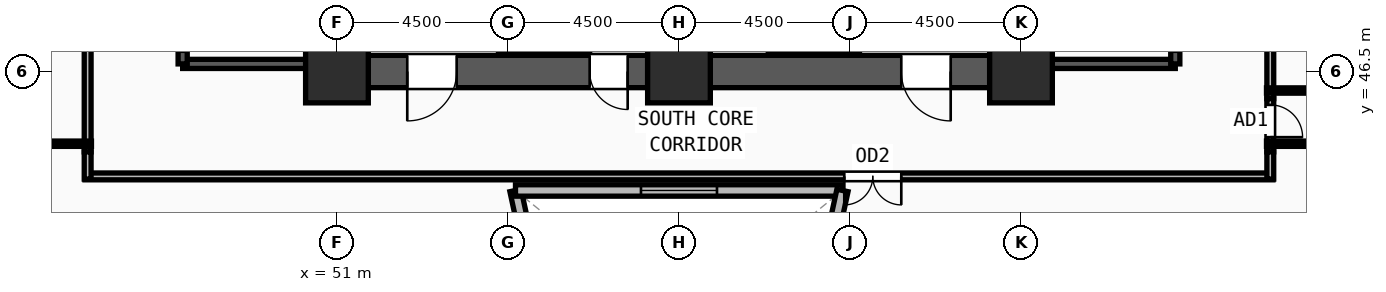
"""IFC4 building model, lengths in metres.
Left out: names, types, materials, properties, quantities, classifications, styles, units other than length and angle.
Written with IfcOpenShell. Run it as: python <this file> out.ifc"""

import sys

from ifc_helpers import new_model, si_unit, direction, frame, frame_2d, origin, origin_2d, place, context, subcontext, project, spatial, rectangle, extrude, source, transform, mapped, element, fill, save


model = new_model("IFC4")
c1 = context("Model", 3, precision=1e-05, world=origin(), true_north=direction((0.0, 1.0)))
c2 = subcontext(c1, "Body", "Model", "MODEL_VIEW")
j1 = project(units=[si_unit("LENGTHUNIT", "METRE"), si_unit("PLANEANGLEUNIT", "RADIAN")], contexts=[c1])
p1 = place(None, origin())
s1 = spatial("IfcSite", under=j1, at=p1, CompositionType="ELEMENT")
p2 = place(p1, origin())
s2 = spatial("IfcBuilding", under=s1, at=p2, CompositionType="ELEMENT")
p3 = place(p2, frame((0.0, 0.0, 63.0)))
s3 = spatial("IfcBuildingStorey", under=s2, at=p3, CompositionType="ELEMENT", Elevation=63.0)
m1 = source(origin(), c2, "Body", "SweptSolid", [
    extrude(rectangle(XDim=1.65, YDim=1.65, at=origin_2d()), origin(), (0.0, 0.0, 1.0), 3.75),
])
for number, where, z_axis, x_axis in (
    (1, (51.0, 46.5, 0.0), (0.0, 0.0, 1.0), (1.0, 0.0, 0.0)),
    (2, (60.0, 46.5, 0.0), (0.0, 0.0, 1.0), (1.0, 0.0, 0.0)),
    (3, (69.0, 46.5, 0.0), (0.0, 0.0, 1.0), (1.0, 0.0, 0.0)),
):
    element("IfcColumn", number, at=place(p3, frame(where, z_axis=z_axis, x_axis=x_axis)), inside=s3, PredefinedType="COLUMN", context=c2, shape_type="MappedRepresentation", body=[
        mapped(m1, transform((0.0, 0.0, 0.0), x_axis=(1.0, 0.0, 0.0), y_axis=(0.0, 1.0, 0.0), z_axis=(0.0, 0.0, 1.0), scale=1.0)),
    ])
p4 = place(p3, frame((68.175, 46.5, 0.0), z_axis=(0.0, 0.0, 1.0), x_axis=(-1.0, 0.0, 0.0)))
e4 = element("IfcWall", 4, at=p4, inside=s3, PredefinedType="SHEAR", context=c2, shape_type="SweptSolid", body=[
    extrude(rectangle(XDim=7.35, YDim=0.85, at=frame_2d((3.675, 0.0))), origin(), (0.0, 0.0, 1.0), 3.57),
])
m2 = source(origin(), c2, "Body", "SweptSolid", [
    extrude(rectangle(XDim=1.3, YDim=2.2, at=frame_2d((0.65, 1.1))), frame((0.0, 0.435, 0.0), z_axis=(0.0, -1.0, 0.0), x_axis=(1.0, 0.0, 0.0)), (0.0, 0.0, 1.0), 0.87),
])
p5 = place(p4, frame((1.025, 0.0, 0.0)))
e5 = element("IfcOpeningElement", 5, at=p5, cuts=e4, PredefinedType="OPENING", context=c2, shape_type="MappedRepresentation", body=[
    mapped(m2, transform((0.0, 0.0, 0.0), x_axis=(1.0, 0.0, 0.0), y_axis=(0.0, 1.0, 0.0), z_axis=(0.0, 0.0, 1.0), scale=1.0)),
])
p6 = place(p3, frame((59.175, 46.5, 0.0), z_axis=(0.0, 0.0, 1.0), x_axis=(-1.0, 0.0, 0.0)))
e6 = element("IfcWall", 6, at=p6, inside=s3, PredefinedType="SHEAR", context=c2, shape_type="SweptSolid", body=[
    extrude(rectangle(XDim=7.35, YDim=0.85, at=frame_2d((3.675, 0.0))), origin(), (0.0, 0.0, 1.0), 3.57),
])
p7 = place(p6, frame((5.025, 0.0, 0.0)))
e7 = element("IfcOpeningElement", 7, at=p7, cuts=e6, PredefinedType="OPENING", context=c2, shape_type="MappedRepresentation", body=[
    mapped(m2, transform((0.0, 0.0, 0.0), x_axis=(1.0, 0.0, 0.0), y_axis=(0.0, 1.0, 0.0), z_axis=(0.0, 0.0, 1.0), scale=1.0)),
])
m3 = source(origin(), c2, "Body", "SweptSolid", [
    extrude(rectangle(XDim=1.0, YDim=2.2, at=frame_2d((0.5, 1.1))), frame((0.0, 0.435, 0.0), z_axis=(0.0, -1.0, 0.0), x_axis=(1.0, 0.0, 0.0)), (0.0, 0.0, 1.0), 0.87),
])
p8 = place(p6, frame((0.525, 0.0, 0.0)))
e8 = element("IfcOpeningElement", 8, at=p8, cuts=e6, PredefinedType="OPENING", context=c2, shape_type="MappedRepresentation", body=[
    mapped(m3, transform((0.0, 0.0, 0.0), x_axis=(1.0, 0.0, 0.0), y_axis=(0.0, 1.0, 0.0), z_axis=(0.0, 0.0, 1.0), scale=1.0)),
])
p9 = place(p3, frame((46.94, 46.7, 0.0), z_axis=(0.0, 0.0, 1.0), x_axis=(1.0, 0.0, 0.0)))
e9 = element("IfcWall", 9, at=p9, inside=s3, PredefinedType="SOLIDWALL", context=c2, shape_type="SweptSolid", body=[
    extrude(rectangle(XDim=3.44, YDim=0.24, at=frame_2d((1.72, 0.0))), origin(), (0.0, 0.0, 1.0), 3.57),
])
p10 = place(p3, frame((50.38, 46.7, 0.0), z_axis=(0.0, 0.0, 1.0), x_axis=(0.0, 1.0, 0.0)))
e10 = element("IfcWall", 10, at=p10, inside=s3, PredefinedType="SOLIDWALL", context=c2, shape_type="SweptSolid", body=[
    extrude(rectangle(XDim=7.82, YDim=0.24, at=frame_2d((3.91, 0.0))), origin(), (0.0, 0.0, 1.0), 3.57),
])
p11 = place(p3, frame((46.94, 54.52, 0.0), z_axis=(0.0, 0.0, 1.0), x_axis=(0.0, -1.0, 0.0)))
e11 = element("IfcWall", 11, at=p11, inside=s3, PredefinedType="SOLIDWALL", context=c2, shape_type="SweptSolid", body=[
    extrude(rectangle(XDim=7.82, YDim=0.24, at=frame_2d((3.91, 0.0))), origin(), (0.0, 0.0, 1.0), 3.57),
])
m4 = source(origin(), c2, "Body", "SweptSolid", [
    extrude(rectangle(XDim=1.2, YDim=2.2, at=frame_2d((0.6, 1.1))), frame((0.0, 0.13, 0.0), z_axis=(0.0, -1.0, 0.0), x_axis=(1.0, 0.0, 0.0)), (0.0, 0.0, 1.0), 0.26),
])
p12 = place(p11, frame((6.3, 0.0, 0.0)))
e12 = element("IfcOpeningElement", 12, at=p12, cuts=e11, PredefinedType="OPENING", context=c2, shape_type="MappedRepresentation", body=[
    mapped(m4, transform((0.0, 0.0, 0.0), x_axis=(1.0, 0.0, 0.0), y_axis=(0.0, 1.0, 0.0), z_axis=(0.0, 0.0, 1.0), scale=1.0)),
])
p13 = place(p3, frame((69.62, 46.7, 0.0), z_axis=(0.0, 0.0, 1.0), x_axis=(1.0, 0.0, 0.0)))
e13 = element("IfcWall", 13, at=p13, inside=s3, PredefinedType="SOLIDWALL", context=c2, shape_type="SweptSolid", body=[
    extrude(rectangle(XDim=3.44, YDim=0.24, at=frame_2d((1.72, 0.0))), origin(), (0.0, 0.0, 1.0), 3.57),
])
p14 = place(p3, frame((73.06, 46.7, 0.0), z_axis=(0.0, 0.0, 1.0), x_axis=(0.0, 1.0, 0.0)))
e14 = element("IfcWall", 14, at=p14, inside=s3, PredefinedType="SOLIDWALL", context=c2, shape_type="SweptSolid", body=[
    extrude(rectangle(XDim=7.82, YDim=0.24, at=frame_2d((3.91, 0.0))), origin(), (0.0, 0.0, 1.0), 3.57),
])
p15 = place(p14, frame((0.32, 0.0, 0.0)))
e15 = element("IfcOpeningElement", 15, at=p15, cuts=e14, PredefinedType="OPENING", context=c2, shape_type="MappedRepresentation", body=[
    mapped(m4, transform((0.0, 0.0, 0.0), x_axis=(1.0, 0.0, 0.0), y_axis=(0.0, 1.0, 0.0), z_axis=(0.0, 0.0, 1.0), scale=1.0)),
])
p16 = place(p3, frame((69.62, 54.52, 0.0), z_axis=(0.0, 0.0, 1.0), x_axis=(0.0, -1.0, 0.0)))
e16 = element("IfcWall", 16, at=p16, inside=s3, PredefinedType="SOLIDWALL", context=c2, shape_type="SweptSolid", body=[
    extrude(rectangle(XDim=7.82, YDim=0.24, at=frame_2d((3.91, 0.0))), origin(), (0.0, 0.0, 1.0), 3.57),
])
p17 = place(p3, frame((57.204, 36.407, 0.0), z_axis=(0.0, 0.0, 1.0), x_axis=(-0.211408002859, 0.977397900718, 0.0)))
e17 = element("IfcWall", 17, at=p17, inside=s3, PredefinedType="SOLIDWALL", context=c2, shape_type="SweptSolid", body=[
    extrude(rectangle(XDim=7.124, YDim=0.3, at=frame_2d((3.562, 0.0))), origin(), (0.0, 0.0, 1.0), 3.57),
])
m5 = source(origin(), c2, "Body", "SweptSolid", [
    extrude(rectangle(XDim=2.0, YDim=1.9, at=frame_2d((1.0, 0.95))), frame((0.0, 0.16, 0.0), z_axis=(0.0, -1.0, 0.0), x_axis=(1.0, 0.0, 0.0)), (0.0, 0.0, 1.0), 0.32),
])
p18 = place(p17, frame((2.562, 0.0, 0.55)))
e18 = element("IfcOpeningElement", 18, at=p18, cuts=e17, PredefinedType="OPENING", context=c2, shape_type="MappedRepresentation", body=[
    mapped(m5, transform((0.0, 0.0, 0.0), x_axis=(1.0, 0.0, 0.0), y_axis=(0.0, 1.0, 0.0), z_axis=(0.0, 0.0, 1.0), scale=1.0)),
])
p19 = place(p3, frame((55.698, 43.37, 0.0), z_axis=(0.0, 0.0, 1.0), x_axis=(1.0, 0.0, 0.0)))
e19 = element("IfcWall", 19, at=p19, inside=s3, PredefinedType="SOLIDWALL", context=c2, shape_type="SweptSolid", body=[
    extrude(rectangle(XDim=8.604, YDim=0.3, at=frame_2d((4.302, 0.0))), origin(), (0.0, 0.0, 1.0), 3.57),
])
p20 = place(p19, frame((3.302, 0.0, 0.55)))
e20 = element("IfcOpeningElement", 20, at=p20, cuts=e19, PredefinedType="OPENING", context=c2, shape_type="MappedRepresentation", body=[
    mapped(m5, transform((0.0, 0.0, 0.0), x_axis=(1.0, 0.0, 0.0), y_axis=(0.0, 1.0, 0.0), z_axis=(0.0, 0.0, 1.0), scale=1.0)),
])
p21 = place(p3, frame((64.302, 43.37, 0.0), z_axis=(0.0, 0.0, 1.0), x_axis=(-0.211408002859, -0.977397900718, 0.0)))
e21 = element("IfcWall", 21, at=p21, inside=s3, PredefinedType="SOLIDWALL", context=c2, shape_type="SweptSolid", body=[
    extrude(rectangle(XDim=7.124, YDim=0.3, at=frame_2d((3.562, 0.0))), origin(), (0.0, 0.0, 1.0), 3.57),
])
p22 = place(p21, frame((2.562, 0.0, 0.55)))
e22 = element("IfcOpeningElement", 22, at=p22, cuts=e21, PredefinedType="OPENING", context=c2, shape_type="MappedRepresentation", body=[
    mapped(m5, transform((0.0, 0.0, 0.0), x_axis=(1.0, 0.0, 0.0), y_axis=(0.0, 1.0, 0.0), z_axis=(0.0, 0.0, 1.0), scale=1.0)),
])
p23 = place(p3, frame((75.56, 56.34, 0.0), z_axis=(0.0, 0.0, 1.0), x_axis=(0.0, -1.0, 0.0)))
e23 = element("IfcWall", 23, at=p23, inside=s3, PredefinedType="PARTITIONING", context=c2, shape_type="SweptSolid", body=[
    extrude(rectangle(XDim=10.555, YDim=0.18, at=frame_2d((5.278, 0.0))), origin(), (0.0, 0.0, 1.0), 3.57),
])
m6 = source(origin(), c2, "Body", "SweptSolid", [
    extrude(rectangle(XDim=1.5, YDim=2.2, at=frame_2d((0.75, 1.1))), frame((0.0, 0.1, 0.0), z_axis=(0.0, -1.0, 0.0), x_axis=(1.0, 0.0, 0.0)), (0.0, 0.0, 1.0), 0.2),
])
p24 = place(p23, frame((4.528, 0.0, 0.0)))
e24 = element("IfcOpeningElement", 24, at=p24, cuts=e23, PredefinedType="OPENING", context=c2, shape_type="MappedRepresentation", body=[
    mapped(m6, transform((0.0, 0.0, 0.0), x_axis=(1.0, 0.0, 0.0), y_axis=(0.0, 1.0, 0.0), z_axis=(0.0, 0.0, 1.0), scale=1.0)),
])
p25 = place(p3, frame((44.44, 44.385, 0.0), z_axis=(0.0, 0.0, 1.0), x_axis=(0.0, 1.0, 0.0)))
e25 = element("IfcWall", 25, at=p25, inside=s3, PredefinedType="PARTITIONING", context=c2, shape_type="SweptSolid", body=[
    extrude(rectangle(XDim=9.9, YDim=0.18, at=frame_2d((4.95, 0.0))), origin(), (0.0, 0.0, 1.0), 3.57),
])
p26 = place(p25, frame((4.2, 0.0, 0.0)))
e26 = element("IfcOpeningElement", 26, at=p26, cuts=e25, PredefinedType="OPENING", context=c2, shape_type="MappedRepresentation", body=[
    mapped(m6, transform((0.0, 0.0, 0.0), x_axis=(1.0, 0.0, 0.0), y_axis=(0.0, 1.0, 0.0), z_axis=(0.0, 0.0, 1.0), scale=1.0)),
])
p27 = place(p3, frame((75.63, 43.74, 0.0), z_axis=(0.0, 0.0, 1.0), x_axis=(-1.0, 0.0, 0.0)))
e27 = element("IfcWall", 27, at=p27, inside=s3, PredefinedType="PARTITIONING", context=c2, shape_type="SweptSolid", body=[
    extrude(rectangle(XDim=31.26, YDim=0.18, at=frame_2d((15.63, 0.0))), origin(), (0.0, 0.0, 1.0), 3.57),
])
p28 = place(p27, frame((9.78, 0.0, 0.0)))
e28 = element("IfcOpeningElement", 28, at=p28, cuts=e27, PredefinedType="OPENING", context=c2, shape_type="MappedRepresentation", body=[
    mapped(m6, transform((0.0, 0.0, 0.0), x_axis=(1.0, 0.0, 0.0), y_axis=(0.0, 1.0, 0.0), z_axis=(0.0, 0.0, 1.0), scale=1.0)),
])
p29 = place(p3, frame((75.56, 45.785, 0.0), z_axis=(0.0, 0.0, 1.0), x_axis=(0.0, -1.0, 0.0)))
e29 = element("IfcWall", 29, at=p29, inside=s3, PredefinedType="PARTITIONING", context=c2, shape_type="SweptSolid", body=[
    extrude(rectangle(XDim=1.4, YDim=0.18, at=frame_2d((0.7, 0.0))), origin(), (0.0, 0.0, 1.0), 3.57),
])
m7 = source(origin(), c2, "Body", "SweptSolid", [
    extrude(rectangle(XDim=0.85, YDim=2.1, at=frame_2d((0.425, 1.05))), frame((0.0, 0.1, 0.0), z_axis=(0.0, -1.0, 0.0), x_axis=(1.0, 0.0, 0.0)), (0.0, 0.0, 1.0), 0.2),
])
p30 = place(p29, frame((0.163, 0.0, 0.0)))
e30 = element("IfcOpeningElement", 30, at=p30, cuts=e29, PredefinedType="OPENING", context=c2, shape_type="MappedRepresentation", body=[
    mapped(m7, transform((0.0, 0.0, 0.0), x_axis=(1.0, 0.0, 0.0), y_axis=(0.0, 1.0, 0.0), z_axis=(0.0, 0.0, 1.0), scale=1.0)),
])
for number, where, z_axis, x_axis in (
    (31, (44.44, 43.67, 0.0), (0.0, 0.0, 1.0), (0.0, 1.0, 0.0)),
    (32, (75.56, 44.385, 0.0), (0.0, 0.0, 1.0), (0.0, -1.0, 0.0)),
):
    element("IfcWall", number, at=place(p3, frame(where, z_axis=z_axis, x_axis=x_axis)), inside=s3, PredefinedType="PARTITIONING", context=c2, shape_type="SweptSolid", body=[
        extrude(rectangle(XDim=0.715, YDim=0.18, at=frame_2d((0.357, 0.0))), origin(), (0.0, 0.0, 1.0), 3.57),
    ])
p31 = place(p3, frame((44.54, 44.6, 0.0), z_axis=(0.0, 0.0, 1.0), x_axis=(-1.0, 0.0, 0.0)))
e33 = element("IfcWall", 33, at=p31, inside=s3, PredefinedType="PARTITIONING", context=c2, shape_type="SweptSolid", body=[
    extrude(rectangle(XDim=11.229, YDim=0.14, at=frame_2d((5.615, 0.0))), origin(), (0.0, 0.0, 1.0), 3.57),
])
p32 = place(p3, frame((75.46, 44.6, 0.0), z_axis=(0.0, 0.0, 1.0), x_axis=(1.0, 0.0, 0.0)))
e34 = element("IfcWall", 34, at=p32, inside=s3, PredefinedType="PARTITIONING", context=c2, shape_type="SweptSolid", body=[
    extrude(rectangle(XDim=11.568, YDim=0.14, at=frame_2d((5.784, 0.0))), origin(), (0.0, 0.0, 1.0), 2.705),
])
p33 = place(p3, frame((75.46, 46.0, 0.0), z_axis=(0.0, 0.0, 1.0), x_axis=(1.0, 0.0, 0.0)))
e35 = element("IfcWall", 35, at=p33, inside=s3, PredefinedType="PARTITIONING", context=c2, shape_type="SweptSolid", body=[
    extrude(rectangle(XDim=12.255, YDim=0.14, at=frame_2d((6.127, 0.0))), origin(), (0.0, 0.0, 1.0), 3.57),
])
m8 = source(origin(), c2, "Body", "SweptSolid", [
    extrude(rectangle(XDim=1.3, YDim=2.2, at=frame_2d((0.65, 1.1))), frame((0.0, 0.025, 0.0), z_axis=(0.0, -1.0, 0.0), x_axis=(1.0, 0.0, 0.0)), (0.0, 0.0, 1.0), 0.05),
])
p34 = place(p7, origin())
e36 = element("IfcDoor", 36, at=p34, inside=s3, OperationType="SINGLE_SWING_RIGHT", PredefinedType="DOOR", context=c2, shape_type="MappedRepresentation", body=[
    mapped(m8, transform((0.0, 0.0, 0.0), x_axis=(1.0, 0.0, 0.0), y_axis=(0.0, 1.0, 0.0), z_axis=(0.0, 0.0, 1.0), scale=1.0)),
])
fill(e7, e36)
m9 = source(origin(), c2, "Body", "SweptSolid", [
    extrude(rectangle(XDim=1.0, YDim=2.2, at=frame_2d((0.5, 1.1))), frame((0.0, 0.025, 0.0), z_axis=(0.0, -1.0, 0.0), x_axis=(1.0, 0.0, 0.0)), (0.0, 0.0, 1.0), 0.05),
])
p35 = place(p8, origin())
e37 = element("IfcDoor", 37, at=p35, inside=s3, OperationType="SINGLE_SWING_LEFT", PredefinedType="DOOR", context=c2, shape_type="MappedRepresentation", body=[
    mapped(m9, transform((0.0, 0.0, 0.0), x_axis=(1.0, 0.0, 0.0), y_axis=(0.0, 1.0, 0.0), z_axis=(0.0, 0.0, 1.0), scale=1.0)),
])
fill(e8, e37)
p36 = place(p5, origin())
e38 = element("IfcDoor", 38, at=p36, inside=s3, OperationType="SINGLE_SWING_LEFT", PredefinedType="DOOR", context=c2, shape_type="MappedRepresentation", body=[
    mapped(m8, transform((0.0, 0.0, 0.0), x_axis=(1.0, 0.0, 0.0), y_axis=(0.0, 1.0, 0.0), z_axis=(0.0, 0.0, 1.0), scale=1.0)),
])
fill(e5, e38)
m10 = source(origin(), c2, "Body", "SweptSolid", [
    extrude(rectangle(XDim=2.0, YDim=1.9, at=frame_2d((1.0, 0.95))), frame((0.0, 0.03, 0.0), z_axis=(0.0, -1.0, 0.0), x_axis=(1.0, 0.0, 0.0)), (0.0, 0.0, 1.0), 0.06),
])
p37 = place(p20, origin())
e39 = element("IfcWindow", 39, at=p37, inside=s3, PartitioningType="DOUBLE_PANEL_VERTICAL", PredefinedType="WINDOW", context=c2, shape_type="MappedRepresentation", body=[
    mapped(m10, transform((0.0, 0.0, 0.0), x_axis=(1.0, 0.0, 0.0), y_axis=(0.0, 1.0, 0.0), z_axis=(0.0, 0.0, 1.0), scale=1.0)),
])
fill(e20, e39)
m11 = source(origin(), c2, "Body", "SweptSolid", [
    extrude(rectangle(XDim=1.5, YDim=2.2, at=frame_2d((0.75, 1.1))), frame((0.0, 0.025, 0.0), z_axis=(0.0, -1.0, 0.0), x_axis=(1.0, 0.0, 0.0)), (0.0, 0.0, 1.0), 0.05),
])
p38 = place(p28, origin())
e40 = element("IfcDoor", 40, at=p38, inside=s3, OperationType="DOUBLE_DOOR_SINGLE_SWING", PredefinedType="DOOR", context=c2, shape_type="MappedRepresentation", body=[
    mapped(m11, transform((0.0, 0.0, 0.0), x_axis=(1.0, 0.0, 0.0), y_axis=(0.0, 1.0, 0.0), z_axis=(0.0, 0.0, 1.0), scale=1.0)),
])
fill(e28, e40)
m12 = source(origin(), c2, "Body", "SweptSolid", [
    extrude(rectangle(XDim=0.85, YDim=2.1, at=frame_2d((0.425, 1.05))), frame((0.0, 0.025, 0.0), z_axis=(0.0, -1.0, 0.0), x_axis=(1.0, 0.0, 0.0)), (0.0, 0.0, 1.0), 0.05),
])
p39 = place(p30, origin())
e41 = element("IfcDoor", 41, at=p39, inside=s3, OperationType="SINGLE_SWING_RIGHT", PredefinedType="DOOR", context=c2, shape_type="MappedRepresentation", body=[
    mapped(m12, transform((0.0, 0.0, 0.0), x_axis=(1.0, 0.0, 0.0), y_axis=(0.0, 1.0, 0.0), z_axis=(0.0, 0.0, 1.0), scale=1.0)),
])
fill(e30, e41)
save(model, sys.argv[1])
